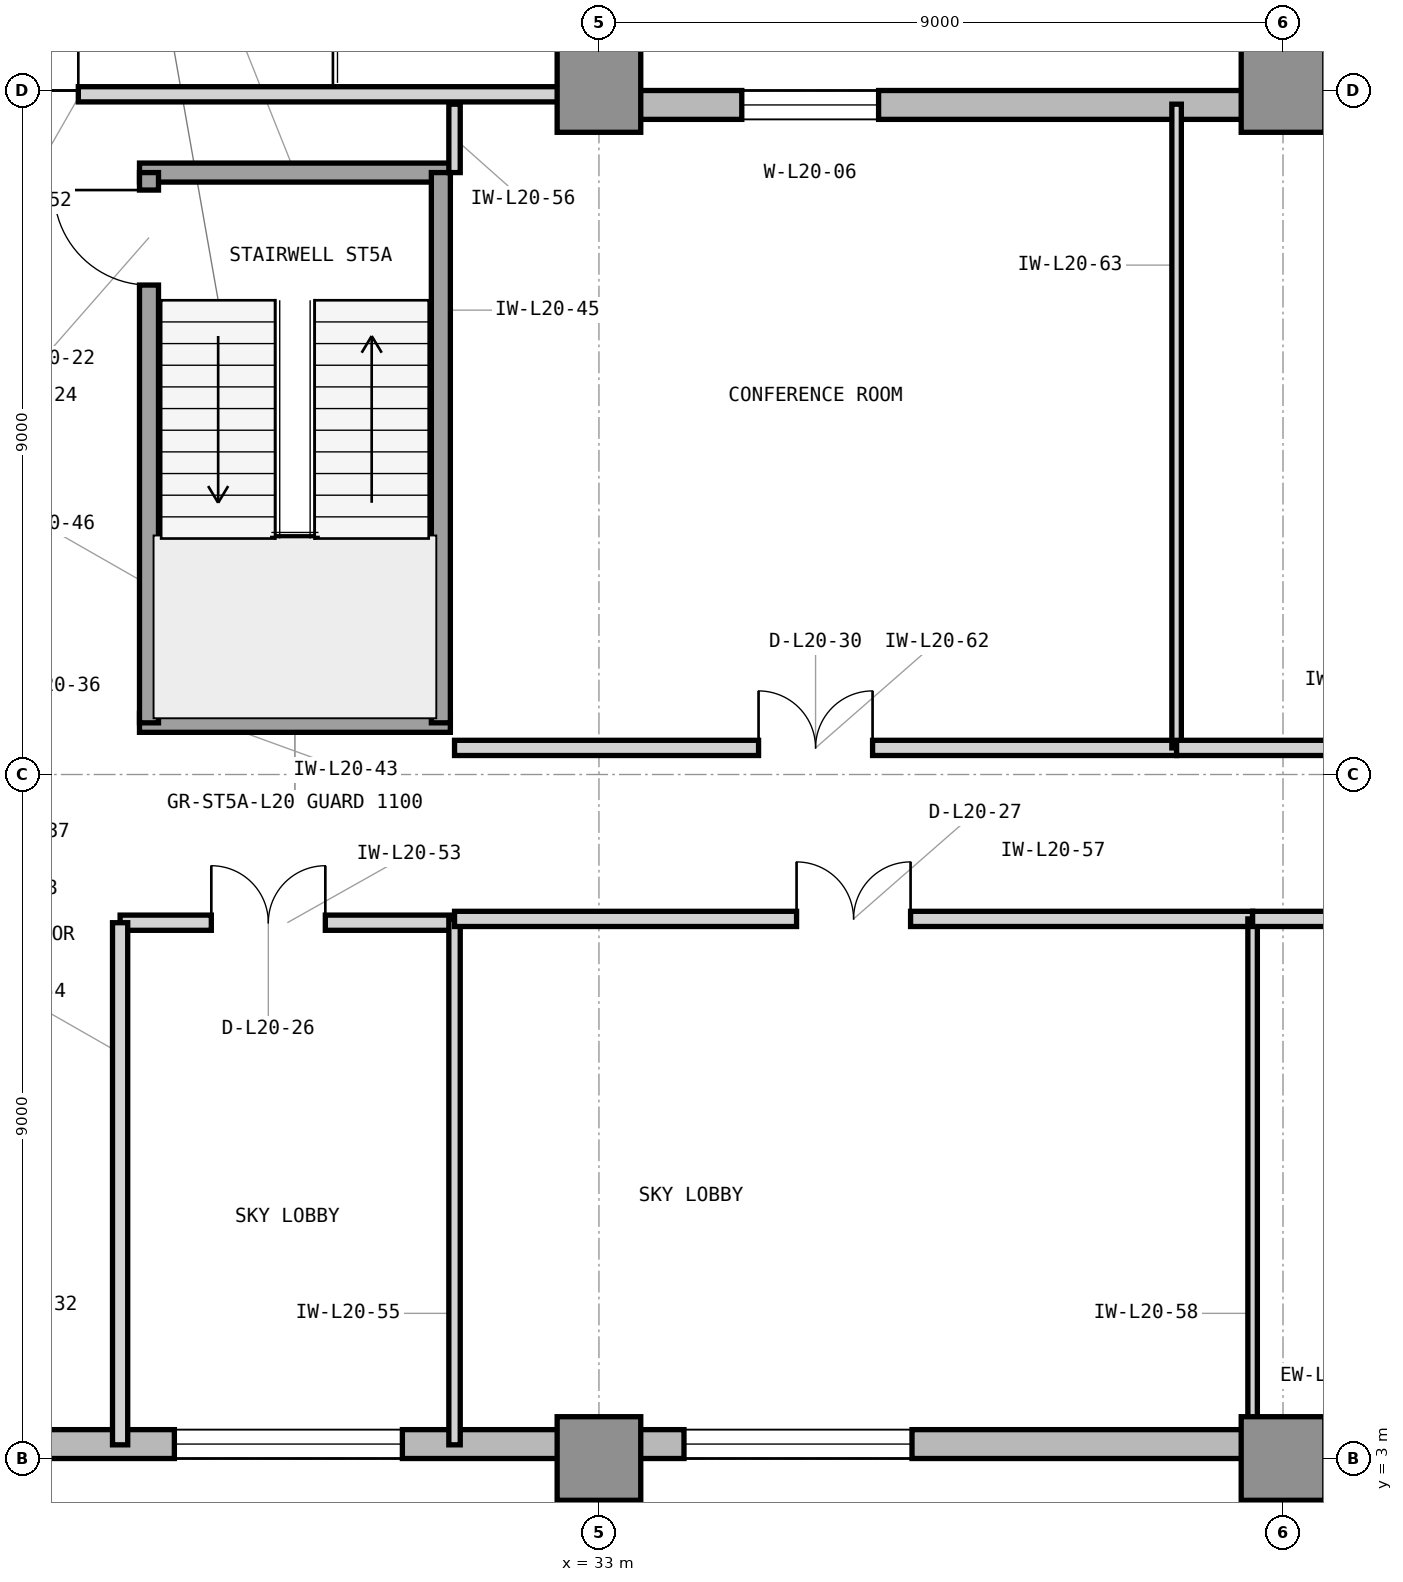
"""IFC4 building model, lengths in metres.
Left out: names, types, materials, properties, quantities, classifications, styles, units other than length and angle.
Written with IfcOpenShell. Run it as: python <this file> out.ifc"""

import sys

from ifc_helpers import new_model, si_unit, direction, frame, frame_2d, origin, origin_2d, place, context, subcontext, project, spatial, rectangle, extrude, element, fill, save


model = new_model("IFC4")
c1 = context("Model", 3, precision=1e-05, world=origin(), true_north=direction((0.0, 1.0)))
c2 = subcontext(c1, "Body", "Model", "MODEL_VIEW")
j1 = project(units=[si_unit("LENGTHUNIT", "METRE"), si_unit("PLANEANGLEUNIT", "RADIAN")], contexts=[c1])
p1 = place(None, origin())
s1 = spatial("IfcSite", under=j1, at=p1, CompositionType="ELEMENT")
p2 = place(p1, origin())
s2 = spatial("IfcBuilding", under=s1, at=p2, CompositionType="ELEMENT")
p3 = place(p2, frame((0.0, 0.0, 89.1)))
s3 = spatial("IfcBuildingStorey", under=s2, at=p3, CompositionType="ELEMENT", Elevation=89.1)
for number, where, z_axis, x_axis in (
    (1, (33.0, 3.0, 0.0), (0.0, 0.0, 1.0), (1.0, 0.0, 0.0)),
    (2, (33.0, 21.0, 0.0), (0.0, 0.0, 1.0), (1.0, 0.0, 0.0)),
    (3, (42.0, 3.0, 0.0), (0.0, 0.0, 1.0), (1.0, 0.0, 0.0)),
    (4, (42.0, 21.0, 0.0), (0.0, 0.0, 1.0), (1.0, 0.0, 0.0)),
):
    element("IfcColumn", number, at=place(p3, frame(where, z_axis=z_axis, x_axis=x_axis)), inside=s3, PredefinedType="COLUMN", context=c2, shape_type="SweptSolid", body=[
        extrude(rectangle(XDim=1.1, YDim=1.1, at=origin_2d()), origin(), (0.0, 0.0, 1.0), 4.2),
    ])
p4 = place(p3, frame((23.9, 3.19, 0.0), z_axis=(0.0, 0.0, 1.0), x_axis=(1.0, 0.0, 0.0)))
e5 = element("IfcWall", 5, at=p4, inside=s3, PredefinedType="STANDARD", context=c2, shape_type="SweptSolid", body=[
    extrude(rectangle(XDim=37.5, YDim=0.38, at=frame_2d((18.75, 0.0))), origin(), (0.0, 0.0, 1.0), 4.0),
])
p5 = place(p4, frame((10.219, 0.0, 0.7)))
e6 = element("IfcOpeningElement", 6, at=p5, cuts=e5, PredefinedType="OPENING", context=c2, shape_type="SweptSolid", body=[
    extrude(rectangle(XDim=3.0, YDim=2.6, at=frame_2d((1.5, 1.3))), frame((0.0, 0.2, 0.0), z_axis=(0.0, -1.0, 0.0), x_axis=(1.0, 0.0, 0.0)), (0.0, 0.0, 1.0), 0.4),
])
p6 = place(p4, frame((19.594, 0.0, 0.7)))
e7 = element("IfcOpeningElement", 7, at=p6, cuts=e5, PredefinedType="OPENING", context=c2, shape_type="SweptSolid", body=[
    extrude(rectangle(XDim=3.0, YDim=2.6, at=frame_2d((1.5, 1.3))), frame((0.0, 0.2, 0.0), z_axis=(0.0, -1.0, 0.0), x_axis=(1.0, 0.0, 0.0)), (0.0, 0.0, 1.0), 0.4),
])
p7 = place(p4, frame((3.514, 0.0, 0.7)))
e8 = element("IfcOpeningElement", 8, at=p7, cuts=e5, PredefinedType="OPENING", context=c2, shape_type="SweptSolid", body=[
    extrude(rectangle(XDim=3.0, YDim=2.6, at=frame_2d((1.5, 1.3))), frame((0.0, 0.2, 0.0), z_axis=(0.0, -1.0, 0.0), x_axis=(1.0, 0.0, 0.0)), (0.0, 0.0, 1.0), 0.4),
])
p8 = place(p4, frame((28.024, 0.0, 0.85)))
e9 = element("IfcOpeningElement", 9, at=p8, cuts=e5, PredefinedType="OPENING", context=c2, shape_type="SweptSolid", body=[
    extrude(rectangle(XDim=1.2, YDim=2.25, at=frame_2d((0.6, 1.125))), frame((0.0, 0.2, 0.0), z_axis=(0.0, -1.0, 0.0), x_axis=(1.0, 0.0, 0.0)), (0.0, 0.0, 1.0), 0.4),
])
p9 = place(p3, frame((61.4, 20.81, 0.0), z_axis=(0.0, 0.0, 1.0), x_axis=(-1.0, 0.0, 0.0)))
e10 = element("IfcWall", 10, at=p9, inside=s3, PredefinedType="STANDARD", context=c2, shape_type="SweptSolid", body=[
    extrude(rectangle(XDim=27.95, YDim=0.38, at=frame_2d((13.975, 0.0))), origin(), (0.0, 0.0, 1.0), 4.0),
])
p10 = place(p9, frame((14.804, 0.0, 0.7)))
e11 = element("IfcOpeningElement", 11, at=p10, cuts=e10, PredefinedType="OPENING", context=c2, shape_type="SweptSolid", body=[
    extrude(rectangle(XDim=3.0, YDim=2.6, at=frame_2d((1.5, 1.3))), frame((0.0, 0.2, 0.0), z_axis=(0.0, -1.0, 0.0), x_axis=(1.0, 0.0, 0.0)), (0.0, 0.0, 1.0), 0.4),
])
p11 = place(p9, frame((24.721, 0.0, 0.85)))
e12 = element("IfcOpeningElement", 12, at=p11, cuts=e10, PredefinedType="OPENING", context=c2, shape_type="SweptSolid", body=[
    extrude(rectangle(XDim=1.8, YDim=2.25, at=frame_2d((0.9, 1.125))), frame((0.0, 0.2, 0.0), z_axis=(0.0, -1.0, 0.0), x_axis=(1.0, 0.0, 0.0)), (0.0, 0.0, 1.0), 0.4),
])
p12 = place(p9, frame((8.254, 0.0, 0.85)))
e13 = element("IfcOpeningElement", 13, at=p12, cuts=e10, PredefinedType="OPENING", context=c2, shape_type="SweptSolid", body=[
    extrude(rectangle(XDim=1.2, YDim=2.25, at=frame_2d((0.6, 1.125))), frame((0.0, 0.2, 0.0), z_axis=(0.0, -1.0, 0.0), x_axis=(1.0, 0.0, 0.0)), (0.0, 0.0, 1.0), 0.4),
])
for number, where, z_axis, x_axis in (
    (14, (26.955, 12.68, 0.0), (0.0, 0.0, 1.0), (1.0, 0.0, 0.0)),
    (15, (26.955, 19.92, 0.0), (0.0, 0.0, 1.0), (1.0, 0.0, 0.0)),
):
    element("IfcWall", number, at=place(p3, frame(where, z_axis=z_axis, x_axis=x_axis)), inside=s3, PredefinedType="SHEAR", context=c2, shape_type="SweptSolid", body=[
        extrude(rectangle(XDim=4.09, YDim=0.25, at=frame_2d((2.045, 0.0))), origin(), (0.0, 0.0, 1.0), 4.2),
    ])
p13 = place(p3, frame((30.92, 12.68, 0.0), z_axis=(0.0, 0.0, 1.0), x_axis=(0.0, 1.0, 0.0)))
e16 = element("IfcWall", 16, at=p13, inside=s3, PredefinedType="SHEAR", context=c2, shape_type="SweptSolid", body=[
    extrude(rectangle(XDim=7.24, YDim=0.25, at=frame_2d((3.62, 0.0))), origin(), (0.0, 0.0, 1.0), 4.2),
])
p14 = place(p3, frame((27.08, 12.68, 0.0), z_axis=(0.0, 0.0, 1.0), x_axis=(0.0, 1.0, 0.0)))
e17 = element("IfcWall", 17, at=p14, inside=s3, PredefinedType="SHEAR", context=c2, shape_type="SweptSolid", body=[
    extrude(rectangle(XDim=7.24, YDim=0.25, at=frame_2d((3.62, 0.0))), origin(), (0.0, 0.0, 1.0), 4.2),
])
p15 = place(p14, frame((5.76, 0.0, 0.0)))
e18 = element("IfcOpeningElement", 18, at=p15, cuts=e17, PredefinedType="OPENING", context=c2, shape_type="SweptSolid", body=[
    extrude(rectangle(XDim=1.25, YDim=2.2, at=frame_2d((0.625, 1.1))), frame((0.0, 0.135, 0.0), z_axis=(0.0, -1.0, 0.0), x_axis=(1.0, 0.0, 0.0)), (0.0, 0.0, 1.0), 0.27),
])
p16 = place(p3, frame((24.05, 20.95, 0.0), z_axis=(0.0, 0.0, 1.0), x_axis=(1.0, 0.0, 0.0)))
e19 = element("IfcWall", 19, at=p16, inside=s3, PredefinedType="PARTITIONING", context=c2, shape_type="SweptSolid", body=[
    extrude(rectangle(XDim=8.5, YDim=0.2, at=frame_2d((4.25, 0.0))), origin(), (0.0, 0.0, 1.0), 3.313),
])
p17 = place(p16, frame((0.6, 0.0, 0.0)))
e20 = element("IfcOpeningElement", 20, at=p17, cuts=e19, PredefinedType="OPENING", context=c2, shape_type="SweptSolid", body=[
    extrude(rectangle(XDim=1.5, YDim=2.3, at=frame_2d((0.75, 1.15))), frame((0.0, 0.11, 0.0), z_axis=(0.0, -1.0, 0.0), x_axis=(1.0, 0.0, 0.0)), (0.0, 0.0, 1.0), 0.22),
])
p18 = place(p3, frame((26.7, 10.05, 0.0), z_axis=(0.0, 0.0, 1.0), x_axis=(1.0, 0.0, 0.0)))
e21 = element("IfcWall", 21, at=p18, inside=s3, PredefinedType="PARTITIONING", context=c2, shape_type="SweptSolid", body=[
    extrude(rectangle(XDim=4.4, YDim=0.2, at=frame_2d((2.2, 0.0))), origin(), (0.0, 0.0, 1.0), 3.93),
])
p19 = place(p18, frame((1.2, 0.0, 0.0)))
e22 = element("IfcOpeningElement", 22, at=p19, cuts=e21, PredefinedType="OPENING", context=c2, shape_type="SweptSolid", body=[
    extrude(rectangle(XDim=1.5, YDim=2.3, at=frame_2d((0.75, 1.15))), frame((0.0, 0.11, 0.0), z_axis=(0.0, -1.0, 0.0), x_axis=(1.0, 0.0, 0.0)), (0.0, 0.0, 1.0), 0.22),
])
p20 = place(p3, frame((26.7, 3.18, 0.0), z_axis=(0.0, 0.0, 1.0), x_axis=(0.0, 1.0, 0.0)))
e23 = element("IfcWall", 23, at=p20, inside=s3, PredefinedType="PARTITIONING", context=c2, shape_type="SweptSolid", body=[
    extrude(rectangle(XDim=6.87, YDim=0.2, at=frame_2d((3.435, 0.0))), origin(), (0.0, 0.0, 1.0), 3.93),
])
p21 = place(p3, frame((31.1, 3.18, 0.0), z_axis=(0.0, 0.0, 1.0), x_axis=(0.0, 1.0, 0.0)))
e24 = element("IfcWall", 24, at=p21, inside=s3, PredefinedType="PARTITIONING", context=c2, shape_type="SweptSolid", body=[
    extrude(rectangle(XDim=6.92, YDim=0.15, at=frame_2d((3.46, 0.0))), origin(), (0.0, 0.0, 1.0), 3.93),
])
p22 = place(p3, frame((31.1, 19.92, 0.0), z_axis=(0.0, 0.0, 1.0), x_axis=(0.0, 1.0, 0.0)))
e25 = element("IfcWall", 25, at=p22, inside=s3, PredefinedType="PARTITIONING", context=c2, shape_type="SweptSolid", body=[
    extrude(rectangle(XDim=0.9, YDim=0.15, at=frame_2d((0.45, 0.0))), origin(), (0.0, 0.0, 1.0), 3.93),
])
p23 = place(p3, frame((31.1, 10.1, 0.0), z_axis=(0.0, 0.0, 1.0), x_axis=(1.0, 0.0, 0.0)))
e26 = element("IfcWall", 26, at=p23, inside=s3, PredefinedType="PARTITIONING", context=c2, shape_type="SweptSolid", body=[
    extrude(rectangle(XDim=10.5, YDim=0.2, at=frame_2d((5.25, 0.0))), origin(), (0.0, 0.0, 1.0), 3.93),
])
p24 = place(p23, frame((4.5, 0.0, 0.0)))
e27 = element("IfcOpeningElement", 27, at=p24, cuts=e26, PredefinedType="OPENING", context=c2, shape_type="SweptSolid", body=[
    extrude(rectangle(XDim=1.5, YDim=2.3, at=frame_2d((0.75, 1.15))), frame((0.0, 0.11, 0.0), z_axis=(0.0, -1.0, 0.0), x_axis=(1.0, 0.0, 0.0)), (0.0, 0.0, 1.0), 0.22),
])
p25 = place(p3, frame((41.6, 3.18, 0.0), z_axis=(0.0, 0.0, 1.0), x_axis=(0.0, 1.0, 0.0)))
e28 = element("IfcWall", 28, at=p25, inside=s3, PredefinedType="PARTITIONING", context=c2, shape_type="SweptSolid", body=[
    extrude(rectangle(XDim=6.92, YDim=0.125, at=frame_2d((3.46, 0.0))), origin(), (0.0, 0.0, 1.0), 3.93),
])
p26 = place(p3, frame((41.6, 10.1, 0.0), z_axis=(0.0, 0.0, 1.0), x_axis=(1.0, 0.0, 0.0)))
e29 = element("IfcWall", 29, at=p26, inside=s3, PredefinedType="PARTITIONING", context=c2, shape_type="SweptSolid", body=[
    extrude(rectangle(XDim=10.02, YDim=0.2, at=frame_2d((5.01, 0.0))), origin(), (0.0, 0.0, 1.0), 3.93),
])
p27 = place(p26, frame((4.01, 0.0, 0.0)))
e30 = element("IfcOpeningElement", 30, at=p27, cuts=e29, PredefinedType="OPENING", context=c2, shape_type="SweptSolid", body=[
    extrude(rectangle(XDim=2.0, YDim=2.5, at=frame_2d((1.0, 1.25))), frame((0.0, 0.11, 0.0), z_axis=(0.0, -1.0, 0.0), x_axis=(1.0, 0.0, 0.0)), (0.0, 0.0, 1.0), 0.22),
])
p28 = place(p3, frame((31.1, 12.35, 0.0), z_axis=(0.0, 0.0, 1.0), x_axis=(1.0, 0.0, 0.0)))
e31 = element("IfcWall", 31, at=p28, inside=s3, PredefinedType="PARTITIONING", context=c2, shape_type="SweptSolid", body=[
    extrude(rectangle(XDim=9.5, YDim=0.2, at=frame_2d((4.75, 0.0))), origin(), (0.0, 0.0, 1.0), 3.93),
])
p29 = place(p28, frame((4.0, 0.0, 0.0)))
e32 = element("IfcOpeningElement", 32, at=p29, cuts=e31, PredefinedType="OPENING", context=c2, shape_type="SweptSolid", body=[
    extrude(rectangle(XDim=1.5, YDim=2.3, at=frame_2d((0.75, 1.15))), frame((0.0, 0.11, 0.0), z_axis=(0.0, -1.0, 0.0), x_axis=(1.0, 0.0, 0.0)), (0.0, 0.0, 1.0), 0.22),
])
p30 = place(p3, frame((40.6, 12.35, 0.0), z_axis=(0.0, 0.0, 1.0), x_axis=(0.0, 1.0, 0.0)))
e33 = element("IfcWall", 33, at=p30, inside=s3, PredefinedType="PARTITIONING", context=c2, shape_type="SweptSolid", body=[
    extrude(rectangle(XDim=8.47, YDim=0.125, at=frame_2d((4.235, 0.0))), origin(), (0.0, 0.0, 1.0), 3.93),
])
p31 = place(p3, frame((40.6, 12.35, 0.0), z_axis=(0.0, 0.0, 1.0), x_axis=(1.0, 0.0, 0.0)))
e34 = element("IfcWall", 34, at=p31, inside=s3, PredefinedType="PARTITIONING", context=c2, shape_type="SweptSolid", body=[
    extrude(rectangle(XDim=9.5, YDim=0.2, at=frame_2d((4.75, 0.0))), origin(), (0.0, 0.0, 1.0), 3.93),
])
p32 = place(p31, frame((4.25, 0.0, 0.0)))
e35 = element("IfcOpeningElement", 35, at=p32, cuts=e34, PredefinedType="OPENING", context=c2, shape_type="SweptSolid", body=[
    extrude(rectangle(XDim=1.0, YDim=2.15, at=frame_2d((0.5, 1.075))), frame((0.0, 0.11, 0.0), z_axis=(0.0, -1.0, 0.0), x_axis=(1.0, 0.0, 0.0)), (0.0, 0.0, 1.0), 0.22),
])
p33 = place(p5, origin())
e36 = element("IfcWindow", 36, at=p33, inside=s3, PartitioningType="SINGLE_PANEL", PredefinedType="WINDOW", context=c2, shape_type="SweptSolid", body=[
    extrude(rectangle(XDim=3.0, YDim=2.6, at=frame_2d((1.5, 1.3))), frame((0.0, 0.11, 0.0), z_axis=(0.0, -1.0, 0.0), x_axis=(1.0, 0.0, 0.0)), (0.0, 0.0, 1.0), 0.06),
])
fill(e6, e36)
p34 = place(p11, origin())
e37 = element("IfcWindow", 37, at=p34, inside=s3, PartitioningType="SINGLE_PANEL", PredefinedType="WINDOW", context=c2, shape_type="SweptSolid", body=[
    extrude(rectangle(XDim=1.8, YDim=2.25, at=frame_2d((0.9, 1.125))), frame((0.0, 0.11, 0.0), z_axis=(0.0, -1.0, 0.0), x_axis=(1.0, 0.0, 0.0)), (0.0, 0.0, 1.0), 0.06),
])
fill(e12, e37)
p35 = place(p15, origin())
e38 = element("IfcDoor", 38, at=p35, inside=s3, OperationType="SINGLE_SWING_RIGHT", PredefinedType="DOOR", context=c2, shape_type="SweptSolid", body=[
    extrude(rectangle(XDim=1.25, YDim=2.2, at=frame_2d((0.625, 1.1))), frame((0.0, 0.025, 0.0), z_axis=(0.0, -1.0, 0.0), x_axis=(1.0, 0.0, 0.0)), (0.0, 0.0, 1.0), 0.05),
])
fill(e18, e38)
p36 = place(p17, origin())
e39 = element("IfcDoor", 39, at=p36, inside=s3, OperationType="DOUBLE_DOOR_SINGLE_SWING", PredefinedType="DOOR", context=c2, shape_type="SweptSolid", body=[
    extrude(rectangle(XDim=1.5, YDim=2.3, at=frame_2d((0.75, 1.15))), frame((0.0, 0.025, 0.0), z_axis=(0.0, -1.0, 0.0), x_axis=(1.0, 0.0, 0.0)), (0.0, 0.0, 1.0), 0.05),
])
fill(e20, e39)
p37 = place(p19, origin())
e40 = element("IfcDoor", 40, at=p37, inside=s3, OperationType="DOUBLE_DOOR_SINGLE_SWING", PredefinedType="DOOR", context=c2, shape_type="SweptSolid", body=[
    extrude(rectangle(XDim=1.5, YDim=2.3, at=frame_2d((0.75, 1.15))), frame((0.0, 0.025, 0.0), z_axis=(0.0, -1.0, 0.0), x_axis=(1.0, 0.0, 0.0)), (0.0, 0.0, 1.0), 0.05),
])
fill(e22, e40)
p38 = place(p24, origin())
e41 = element("IfcDoor", 41, at=p38, inside=s3, OperationType="DOUBLE_DOOR_SINGLE_SWING", PredefinedType="DOOR", context=c2, shape_type="SweptSolid", body=[
    extrude(rectangle(XDim=1.5, YDim=2.3, at=frame_2d((0.75, 1.15))), frame((0.0, 0.025, 0.0), z_axis=(0.0, -1.0, 0.0), x_axis=(1.0, 0.0, 0.0)), (0.0, 0.0, 1.0), 0.05),
])
fill(e27, e41)
p39 = place(p29, origin())
e42 = element("IfcDoor", 42, at=p39, inside=s3, OperationType="DOUBLE_DOOR_SINGLE_SWING", PredefinedType="DOOR", context=c2, shape_type="SweptSolid", body=[
    extrude(rectangle(XDim=1.5, YDim=2.3, at=frame_2d((0.75, 1.15))), frame((0.0, 0.025, 0.0), z_axis=(0.0, -1.0, 0.0), x_axis=(1.0, 0.0, 0.0)), (0.0, 0.0, 1.0), 0.05),
])
fill(e32, e42)
p40 = place(p7, origin())
e43 = element("IfcWindow", 43, at=p40, inside=s3, PartitioningType="SINGLE_PANEL", PredefinedType="WINDOW", context=c2, shape_type="SweptSolid", body=[
    extrude(rectangle(XDim=3.0, YDim=2.6, at=frame_2d((1.5, 1.3))), frame((0.0, 0.11, 0.0), z_axis=(0.0, -1.0, 0.0), x_axis=(1.0, 0.0, 0.0)), (0.0, 0.0, 1.0), 0.06),
])
fill(e8, e43)
save(model, sys.argv[1])
